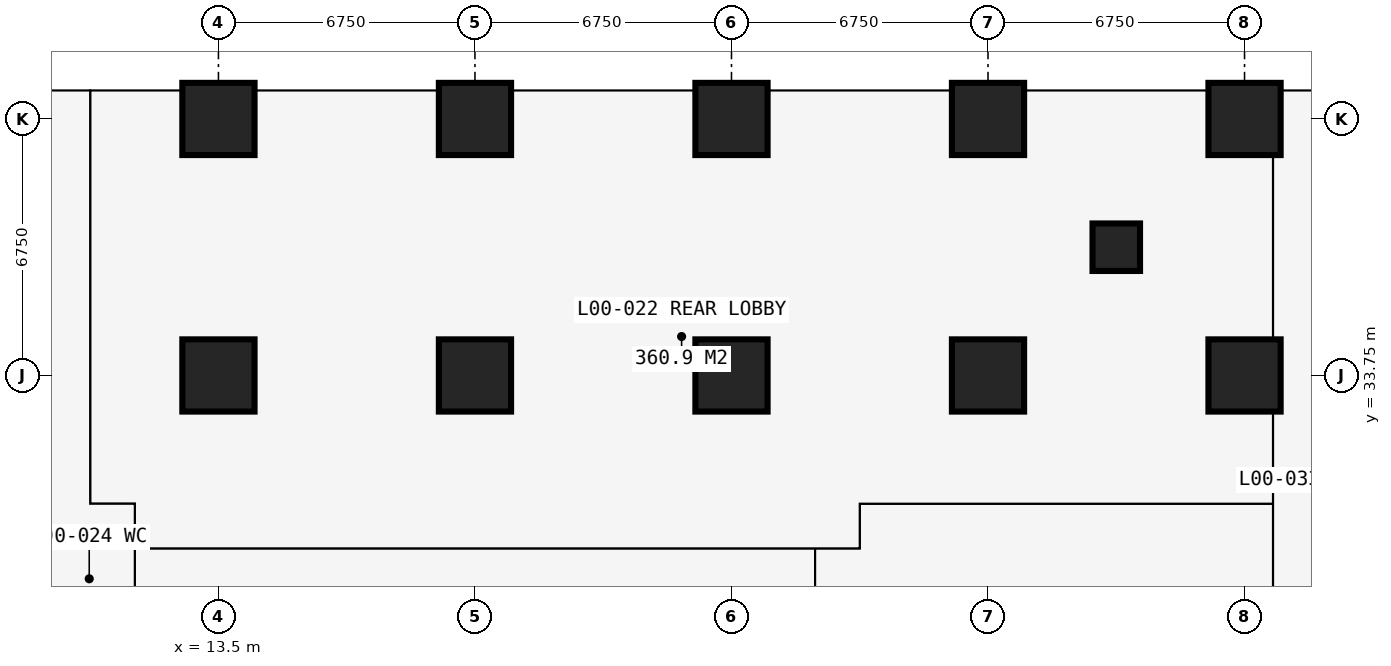
"""IFC4 building model, lengths in metres.
Left out: names, types, materials, properties, quantities, classifications, styles, units other than length and angle.
Written with IfcOpenShell. Run it as: python <this file> out.ifc"""

import sys

from ifc_helpers import new_model, si_unit, direction, frame, frame_2d, origin, origin_2d, place, context, subcontext, project, spatial, rectangle, extrude, element, fill, save


model = new_model("IFC4")
c1 = context("Model", 3, precision=1e-05, world=origin(), true_north=direction((0.0, 1.0)))
c2 = subcontext(c1, "Body", "Model", "MODEL_VIEW")
j1 = project(units=[si_unit("LENGTHUNIT", "METRE"), si_unit("PLANEANGLEUNIT", "RADIAN")], contexts=[c1])
p1 = place(None, origin())
s1 = spatial("IfcSite", under=j1, at=p1, CompositionType="ELEMENT")
p2 = place(p1, origin())
s2 = spatial("IfcBuilding", under=s1, at=p2, CompositionType="ELEMENT")
p3 = place(p2, origin())
s3 = spatial("IfcBuildingStorey", under=s2, at=p3, CompositionType="ELEMENT", Elevation=0.0)
for number, where, z_axis, x_axis in (
    (1, (13.5, 33.75, 0.0), (0.0, 0.0, 1.0), (1.0, 0.0, 0.0)),
    (2, (13.5, 40.5, 0.0), (0.0, 0.0, 1.0), (1.0, 0.0, 0.0)),
    (3, (20.25, 33.75, 0.0), (0.0, 0.0, 1.0), (1.0, 0.0, 0.0)),
    (4, (20.25, 40.5, 0.0), (0.0, 0.0, 1.0), (1.0, 0.0, 0.0)),
    (5, (27.0, 33.75, 0.0), (0.0, 0.0, 1.0), (1.0, 0.0, 0.0)),
    (6, (27.0, 40.5, 0.0), (0.0, 0.0, 1.0), (1.0, 0.0, 0.0)),
    (7, (33.75, 33.75, 0.0), (0.0, 0.0, 1.0), (1.0, 0.0, 0.0)),
    (8, (33.75, 40.5, 0.0), (0.0, 0.0, 1.0), (1.0, 0.0, 0.0)),
):
    element("IfcColumn", number, at=place(p3, frame(where, z_axis=z_axis, x_axis=x_axis)), inside=s3, PredefinedType="COLUMN", context=c2, shape_type="SweptSolid", body=[
        extrude(rectangle(XDim=1.9, YDim=1.9, at=origin_2d()), origin(), (0.0, 0.0, 1.0), 4.5),
    ])
p4 = place(p3, frame((37.125, 37.125, 0.0), z_axis=(0.0, 0.0, 1.0), x_axis=(1.0, 0.0, 0.0)))
e9 = element("IfcColumn", 9, at=p4, inside=s3, PredefinedType="COLUMN", context=c2, shape_type="SweptSolid", body=[
    extrude(rectangle(XDim=1.25, YDim=1.25, at=origin_2d()), origin(), (0.0, 0.0, 1.0), 4.5),
])
for number, where, z_axis, x_axis in (
    (10, (40.5, 33.75, 0.0), (0.0, 0.0, 1.0), (1.0, 0.0, 0.0)),
    (11, (40.5, 40.5, 0.0), (0.0, 0.0, 1.0), (1.0, 0.0, 0.0)),
):
    element("IfcColumn", number, at=place(p3, frame(where, z_axis=z_axis, x_axis=x_axis)), inside=s3, PredefinedType="COLUMN", context=c2, shape_type="SweptSolid", body=[
        extrude(rectangle(XDim=1.9, YDim=1.9, at=origin_2d()), origin(), (0.0, 0.0, 1.0), 4.5),
    ])
p5 = place(p3, frame((13.5, 41.25, 0.0), z_axis=(0.0, 0.0, 1.0), x_axis=(1.0, 0.0, 0.0)))
e12 = element("IfcWall", 12, at=p5, inside=s3, PredefinedType="SOLIDWALL", context=c2, shape_type="SweptSolid", body=[
    extrude(rectangle(XDim=6.75, YDim=0.15, at=frame_2d((3.375, 0.0))), origin(), (0.0, 0.0, 1.0), 4.25),
])
p6 = place(p5, frame((1.087, 0.0, 0.0)))
e13 = element("IfcOpeningElement", 13, at=p6, cuts=e12, PredefinedType="OPENING", context=c2, shape_type="SweptSolid", body=[
    extrude(rectangle(XDim=1.2, YDim=2.4, at=frame_2d((0.6, 1.2))), frame((0.0, 0.085, 0.0), z_axis=(0.0, -1.0, 0.0), x_axis=(1.0, 0.0, 0.0)), (0.0, 0.0, 1.0), 0.17),
])
p7 = place(p5, frame((4.462, 0.0, 0.0)))
e14 = element("IfcOpeningElement", 14, at=p7, cuts=e12, PredefinedType="OPENING", context=c2, shape_type="SweptSolid", body=[
    extrude(rectangle(XDim=1.2, YDim=2.4, at=frame_2d((0.6, 1.2))), frame((0.0, 0.085, 0.0), z_axis=(0.0, -1.0, 0.0), x_axis=(1.0, 0.0, 0.0)), (0.0, 0.0, 1.0), 0.17),
])
p8 = place(p3, frame((8.9, 29.2, 0.0), z_axis=(0.0, 0.0, 1.0), x_axis=(1.0, 0.0, 0.0)))
e15 = element("IfcWall", 15, at=p8, inside=s3, PredefinedType="PARTITIONING", context=c2, shape_type="SweptSolid", body=[
    extrude(rectangle(XDim=21.475, YDim=0.15, at=frame_2d((10.738, 0.0))), origin(), (0.0, 0.0, 1.0), 4.25),
])
p9 = place(p8, frame((10.55, 0.0, 0.0)))
e16 = element("IfcOpeningElement", 16, at=p9, cuts=e15, PredefinedType="OPENING", context=c2, shape_type="SweptSolid", body=[
    extrude(rectangle(XDim=1.6, YDim=2.4, at=frame_2d((0.8, 1.2))), frame((0.0, 0.085, 0.0), z_axis=(0.0, -1.0, 0.0), x_axis=(1.0, 0.0, 0.0)), (0.0, 0.0, 1.0), 0.17),
])
p10 = place(p3, frame((10.125, 30.375, 0.0), z_axis=(0.0, 0.0, 1.0), x_axis=(0.0, 1.0, 0.0)))
e17 = element("IfcWall", 17, at=p10, inside=s3, PredefinedType="PARTITIONING", context=c2, shape_type="SweptSolid", body=[
    extrude(rectangle(XDim=10.859, YDim=0.15, at=frame_2d((5.429, 0.0))), origin(), (0.0, 0.0, 1.0), 4.25),
])
p11 = place(p3, frame((10.125, 30.375, 0.0), z_axis=(0.0, 0.0, 1.0), x_axis=(1.0, 0.0, 0.0)))
e18 = element("IfcWall", 18, at=p11, inside=s3, PredefinedType="PARTITIONING", context=c2, shape_type="SweptSolid", body=[
    extrude(rectangle(XDim=1.175, YDim=0.15, at=frame_2d((0.587, 0.0))), origin(), (0.0, 0.0, 1.0), 4.25),
])
p12 = place(p3, frame((11.3, 11.3, 0.0), z_axis=(0.0, 0.0, 1.0), x_axis=(0.0, 1.0, 0.0)))
e19 = element("IfcWall", 19, at=p12, inside=s3, PredefinedType="PARTITIONING", context=c2, shape_type="SweptSolid", body=[
    extrude(rectangle(XDim=19.075, YDim=0.15, at=frame_2d((9.538, 0.0))), origin(), (0.0, 0.0, 1.0), 4.25),
])
p13 = place(p12, frame((14.25, 0.0, 0.0)))
e20 = element("IfcOpeningElement", 20, at=p13, cuts=e19, PredefinedType="OPENING", context=c2, shape_type="SweptSolid", body=[
    extrude(rectangle(XDim=1.0, YDim=2.2, at=frame_2d((0.5, 1.1))), frame((0.0, 0.085, 0.0), z_axis=(0.0, -1.0, 0.0), x_axis=(1.0, 0.0, 0.0)), (0.0, 0.0, 1.0), 0.17),
])
p14 = place(p12, frame((16.35, 0.0, 0.0)))
e21 = element("IfcOpeningElement", 21, at=p14, cuts=e19, PredefinedType="OPENING", context=c2, shape_type="SweptSolid", body=[
    extrude(rectangle(XDim=1.0, YDim=2.2, at=frame_2d((0.5, 1.1))), frame((0.0, 0.085, 0.0), z_axis=(0.0, -1.0, 0.0), x_axis=(1.0, 0.0, 0.0)), (0.0, 0.0, 1.0), 0.17),
])
p15 = place(p12, frame((6.05, 0.0, 0.0)))
e22 = element("IfcOpeningElement", 22, at=p15, cuts=e19, PredefinedType="OPENING", context=c2, shape_type="SweptSolid", body=[
    extrude(rectangle(XDim=1.6, YDim=2.4, at=frame_2d((0.8, 1.2))), frame((0.0, 0.085, 0.0), z_axis=(0.0, -1.0, 0.0), x_axis=(1.0, 0.0, 0.0)), (0.0, 0.0, 1.0), 0.17),
])
p16 = place(p3, frame((29.2, 11.3, 0.0), z_axis=(0.0, 0.0, 1.0), x_axis=(0.0, 1.0, 0.0)))
e23 = element("IfcWall", 23, at=p16, inside=s3, PredefinedType="PARTITIONING", context=c2, shape_type="SweptSolid", body=[
    extrude(rectangle(XDim=17.9, YDim=0.2, at=frame_2d((8.95, 0.0))), origin(), (0.0, 0.0, 1.0), 4.25),
])
p17 = place(p16, frame((15.35, 0.0, 0.0)))
e24 = element("IfcOpeningElement", 24, at=p17, cuts=e23, PredefinedType="OPENING", context=c2, shape_type="SweptSolid", body=[
    extrude(rectangle(XDim=1.6, YDim=2.4, at=frame_2d((0.8, 1.2))), frame((0.0, 0.11, 0.0), z_axis=(0.0, -1.0, 0.0), x_axis=(1.0, 0.0, 0.0)), (0.0, 0.0, 1.0), 0.22),
])
p18 = place(p16, frame((8.35, 0.0, 0.0)))
e25 = element("IfcOpeningElement", 25, at=p18, cuts=e23, PredefinedType="OPENING", context=c2, shape_type="SweptSolid", body=[
    extrude(rectangle(XDim=1.2, YDim=2.2, at=frame_2d((0.6, 1.1))), frame((0.0, 0.11, 0.0), z_axis=(0.0, -1.0, 0.0), x_axis=(1.0, 0.0, 0.0)), (0.0, 0.0, 1.0), 0.22),
])
p19 = place(p3, frame((30.375, 29.2, 0.0), z_axis=(0.0, 0.0, 1.0), x_axis=(0.0, 1.0, 0.0)))
e26 = element("IfcWall", 26, at=p19, inside=s3, PredefinedType="PARTITIONING", context=c2, shape_type="SweptSolid", body=[
    extrude(rectangle(XDim=1.175, YDim=0.15, at=frame_2d((0.587, 0.0))), origin(), (0.0, 0.0, 1.0), 4.25),
])
p20 = place(p3, frame((30.375, 30.375, 0.0), z_axis=(0.0, 0.0, 1.0), x_axis=(1.0, 0.0, 0.0)))
e27 = element("IfcWall", 27, at=p20, inside=s3, PredefinedType="PARTITIONING", context=c2, shape_type="SweptSolid", body=[
    extrude(rectangle(XDim=10.875, YDim=0.15, at=frame_2d((5.438, 0.0))), origin(), (0.0, 0.0, 1.0), 4.25),
])
p21 = place(p3, frame((41.25, -0.75, 0.0), z_axis=(0.0, 0.0, 1.0), x_axis=(0.0, 1.0, 0.0)))
e28 = element("IfcWall", 28, at=p21, inside=s3, PredefinedType="PARTITIONING", context=c2, shape_type="SweptSolid", body=[
    extrude(rectangle(XDim=41.984, YDim=0.15, at=frame_2d((20.992, 0.0))), origin(), (0.0, 0.0, 1.0), 4.25),
])
p22 = place(p21, frame((9.7, 0.0, 0.0)))
e29 = element("IfcOpeningElement", 29, at=p22, cuts=e28, PredefinedType="OPENING", context=c2, shape_type="SweptSolid", body=[
    extrude(rectangle(XDim=1.6, YDim=2.4, at=frame_2d((0.8, 1.2))), frame((0.0, 0.085, 0.0), z_axis=(0.0, -1.0, 0.0), x_axis=(1.0, 0.0, 0.0)), (0.0, 0.0, 1.0), 0.17),
])
p23 = place(p21, frame((25.15, 0.0, 0.0)))
e30 = element("IfcOpeningElement", 30, at=p23, cuts=e28, PredefinedType="OPENING", context=c2, shape_type="SweptSolid", body=[
    extrude(rectangle(XDim=1.6, YDim=2.4, at=frame_2d((0.8, 1.2))), frame((0.0, 0.085, 0.0), z_axis=(0.0, -1.0, 0.0), x_axis=(1.0, 0.0, 0.0)), (0.0, 0.0, 1.0), 0.17),
])
p24 = place(p6, origin())
e31 = element("IfcDoor", 31, at=p24, inside=s3, OperationType="SINGLE_SWING_LEFT", PredefinedType="DOOR", context=c2, shape_type="SweptSolid", body=[
    extrude(rectangle(XDim=1.2, YDim=2.4, at=frame_2d((0.6, 1.2))), frame((0.0, 0.025, 0.0), z_axis=(0.0, -1.0, 0.0), x_axis=(1.0, 0.0, 0.0)), (0.0, 0.0, 1.0), 0.05),
])
fill(e13, e31)
p25 = place(p7, origin())
e32 = element("IfcDoor", 32, at=p25, inside=s3, OperationType="SINGLE_SWING_LEFT", PredefinedType="DOOR", context=c2, shape_type="SweptSolid", body=[
    extrude(rectangle(XDim=1.2, YDim=2.4, at=frame_2d((0.6, 1.2))), frame((0.0, 0.025, 0.0), z_axis=(0.0, -1.0, 0.0), x_axis=(1.0, 0.0, 0.0)), (0.0, 0.0, 1.0), 0.05),
])
fill(e14, e32)
p26 = place(p17, origin())
e33 = element("IfcDoor", 33, at=p26, inside=s3, OperationType="DOUBLE_DOOR_SINGLE_SWING", PredefinedType="DOOR", context=c2, shape_type="SweptSolid", body=[
    extrude(rectangle(XDim=1.6, YDim=2.4, at=frame_2d((0.8, 1.2))), frame((0.0, 0.025, 0.0), z_axis=(0.0, -1.0, 0.0), x_axis=(1.0, 0.0, 0.0)), (0.0, 0.0, 1.0), 0.05),
])
fill(e24, e33)
p27 = place(p9, origin())
e34 = element("IfcDoor", 34, at=p27, inside=s3, OperationType="DOUBLE_DOOR_SINGLE_SWING", PredefinedType="DOOR", context=c2, shape_type="SweptSolid", body=[
    extrude(rectangle(XDim=1.6, YDim=2.4, at=frame_2d((0.8, 1.2))), frame((0.0, 0.025, 0.0), z_axis=(0.0, -1.0, 0.0), x_axis=(1.0, 0.0, 0.0)), (0.0, 0.0, 1.0), 0.05),
])
fill(e16, e34)
p28 = place(p14, origin())
e35 = element("IfcDoor", 35, at=p28, inside=s3, OperationType="SINGLE_SWING_LEFT", PredefinedType="DOOR", context=c2, shape_type="SweptSolid", body=[
    extrude(rectangle(XDim=1.0, YDim=2.2, at=frame_2d((0.5, 1.1))), frame((0.0, 0.025, 0.0), z_axis=(0.0, -1.0, 0.0), x_axis=(1.0, 0.0, 0.0)), (0.0, 0.0, 1.0), 0.05),
])
fill(e21, e35)
save(model, sys.argv[1])
